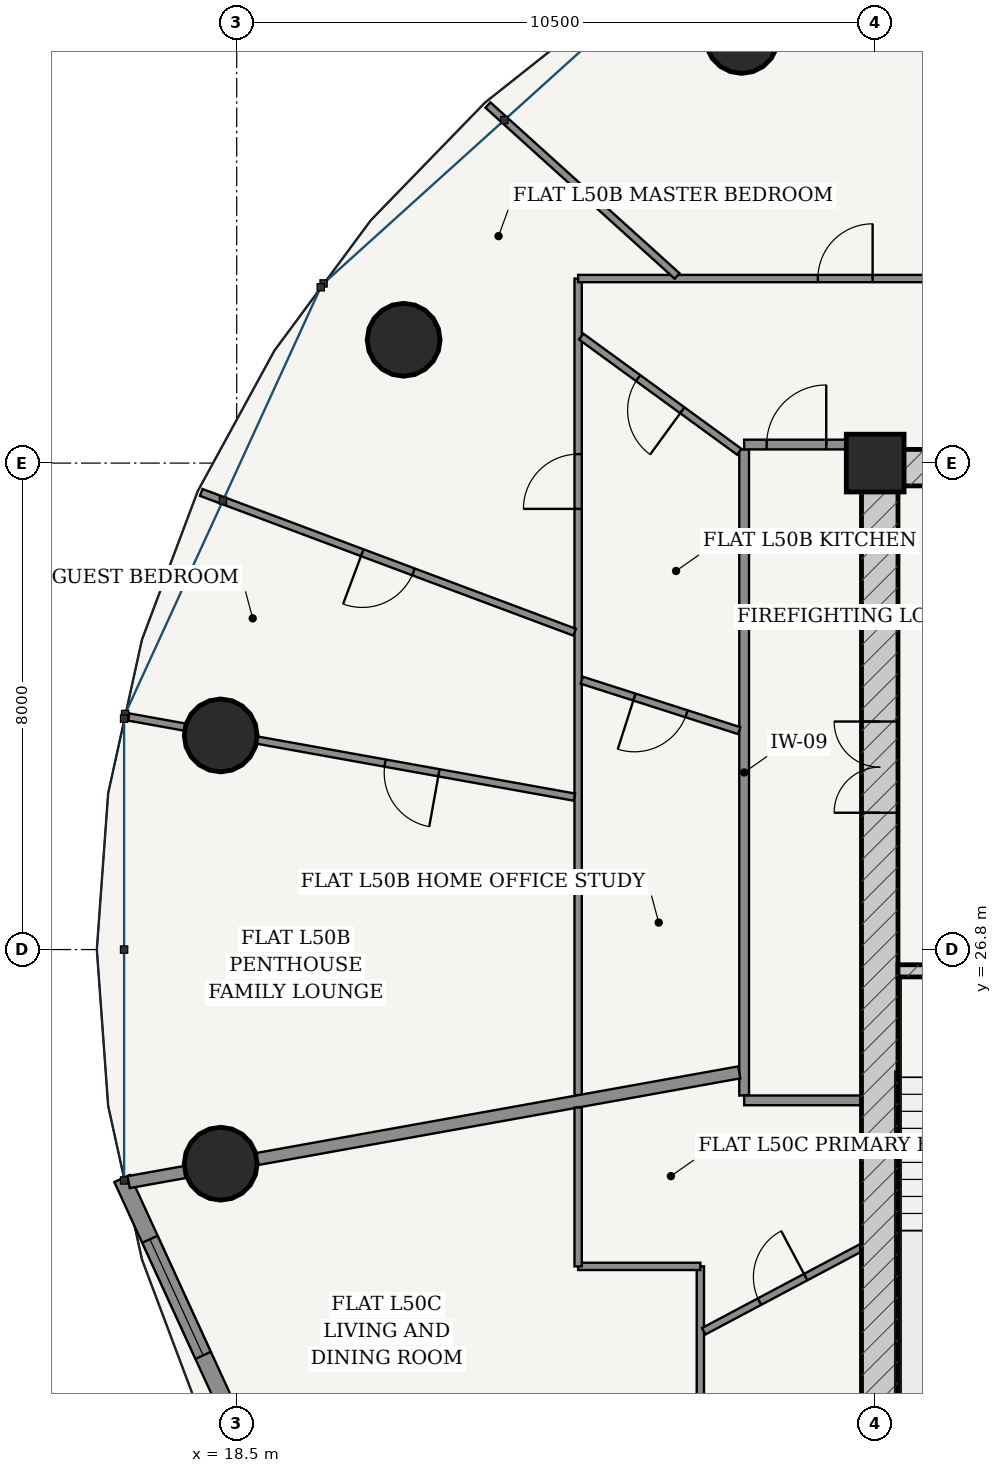
"""IFC4 building model, lengths in metres.
Left out: names, types, materials, properties, quantities, classifications, styles, units other than length and angle.
Written with IfcOpenShell. Run it as: python <this file> out.ifc"""

import sys

from ifc_helpers import new_model, si_unit, direction, frame, frame_2d, origin, origin_2d, place, context, subcontext, project, spatial, rectangle, hollow_circle, extrude, source, transform, mapped, element, fill, save


model = new_model("IFC4")
c1 = context("Model", 3, precision=1e-05, world=origin(), true_north=direction((-0.2419218956, 0.970295726276)))
c2 = subcontext(c1, "Body", "Model", "MODEL_VIEW")
j1 = project(units=[si_unit("LENGTHUNIT", "METRE"), si_unit("PLANEANGLEUNIT", "RADIAN")], contexts=[c1])
p1 = place(None, origin())
s1 = spatial("IfcSite", under=j1, at=p1, CompositionType="ELEMENT")
p2 = place(p1, origin())
s2 = spatial("IfcBuilding", under=s1, at=p2, CompositionType="ELEMENT")
p3 = place(p2, frame((0.0, 0.0, 191.2)))
s3 = spatial("IfcBuildingStorey", under=s2, at=p3, CompositionType="ELEMENT", Elevation=191.2)
p4 = place(p3, frame((29.0, 34.8, 0.0), z_axis=(0.0, 0.0, 1.0), x_axis=(1.0, 0.0, 0.0)))
e1 = element("IfcColumn", 1, at=p4, inside=s3, PredefinedType="COLUMN", context=c2, shape_type="SweptSolid", body=[
    extrude(rectangle(XDim=0.95, YDim=0.95, at=origin_2d()), origin(), (0.0, 0.0, 1.0), 3.7),
])
p5 = place(p3, frame((28.775, 34.725, 0.0), z_axis=(0.0, 0.0, 1.0), x_axis=(1.0, 0.0, 0.0)))
e2 = element("IfcWall", 2, at=p5, inside=s3, PredefinedType="SHEAR", context=c2, shape_type="SweptSolid", body=[
    extrude(rectangle(XDim=18.45, YDim=0.6, at=frame_2d((9.225, 0.0))), origin(), (0.0, 0.0, 1.0), 3.435),
])
p6 = place(p3, frame((29.075, 19.175, 0.0), z_axis=(0.0, 0.0, 1.0), x_axis=(0.0, 1.0, 0.0)))
e3 = element("IfcWall", 3, at=p6, inside=s3, PredefinedType="SHEAR", context=c2, shape_type="SweptSolid", body=[
    extrude(rectangle(XDim=15.25, YDim=0.6, at=frame_2d((7.625, 0.0))), origin(), (0.0, 0.0, 1.0), 3.435),
])
p7 = place(p6, frame((9.875, 0.0, 0.0)))
e4 = element("IfcOpeningElement", 4, at=p7, cuts=e3, PredefinedType="OPENING", context=c2, shape_type="SweptSolid", body=[
    extrude(rectangle(XDim=1.5, YDim=2.2, at=frame_2d((0.75, 1.1))), frame((0.0, 0.31, 0.0), z_axis=(0.0, -1.0, 0.0), x_axis=(1.0, 0.0, 0.0)), (0.0, 0.0, 1.0), 0.62),
])
p8 = place(p3, frame((29.375, 26.45, 0.0), z_axis=(0.0, 0.0, 1.0), x_axis=(1.0, 0.0, 0.0)))
e5 = element("IfcWall", 5, at=p8, inside=s3, PredefinedType="SOLIDWALL", context=c2, shape_type="SweptSolid", body=[
    extrude(rectangle(XDim=3.32, YDim=0.2, at=frame_2d((1.66, 0.0))), origin(), (0.0, 0.0, 1.0), 3.435),
])
p9 = place(p8, frame((1.185, 0.0, 0.0)))
e6 = element("IfcOpeningElement", 6, at=p9, cuts=e5, PredefinedType="OPENING", context=c2, shape_type="SweptSolid", body=[
    extrude(rectangle(XDim=0.95, YDim=2.15, at=frame_2d((0.475, 1.075))), frame((0.0, 0.11, 0.0), z_axis=(0.0, -1.0, 0.0), x_axis=(1.0, 0.0, 0.0)), (0.0, 0.0, 1.0), 0.22),
])
for number, where, z_axis, x_axis in (
    (7, (26.805, 41.808, 0.0), (0.0, 0.0, 1.0), (1.0, 0.0, 0.0)),
    (8, (21.246, 36.828, 0.0), (0.0, 0.0, 1.0), (1.0, 0.0, 0.0)),
    (9, (18.237, 30.321, 0.0), (0.0, 0.0, 1.0), (1.0, 0.0, 0.0)),
    (10, (18.237, 23.279, 0.0), (0.0, 0.0, 1.0), (1.0, 0.0, 0.0)),
):
    element("IfcColumn", number, at=place(p3, frame(where, z_axis=z_axis, x_axis=x_axis)), inside=s3, PredefinedType="COLUMN", context=c2, shape_type="SweptSolid", body=[
        extrude(hollow_circle(Radius=0.6, WallThickness=0.038, at=origin_2d()), origin(), (0.0, 0.0, 1.0), 3.7),
    ])
p10 = place(p3, frame((16.615, 23.035, 0.0), z_axis=(0.0, 0.0, 1.0), x_axis=(0.416717018135, -0.909036262641, 0.0)))
e11 = element("IfcWall", 11, at=p10, inside=s3, PredefinedType="SOLIDWALL", context=c2, shape_type="SweptSolid", body=[
    extrude(rectangle(XDim=7.96, YDim=0.28, at=frame_2d((3.98, 0.0))), origin(), (0.0, 0.0, 1.0), 3.435),
])
p11 = place(p10, frame((1.099, 0.0, 0.85)))
e12 = element("IfcOpeningElement", 12, at=p11, cuts=e11, PredefinedType="OPENING", context=c2, shape_type="SweptSolid", body=[
    extrude(rectangle(XDim=2.1, YDim=1.95, at=frame_2d((1.05, 0.975))), frame((0.0, 0.15, 0.0), z_axis=(0.0, -1.0, 0.0), x_axis=(1.0, 0.0, 0.0)), (0.0, 0.0, 1.0), 0.3),
])
p12 = place(p10, frame((4.761, 0.0, 0.85)))
e13 = element("IfcOpeningElement", 13, at=p12, cuts=e11, PredefinedType="OPENING", context=c2, shape_type="SweptSolid", body=[
    extrude(rectangle(XDim=2.1, YDim=1.95, at=frame_2d((1.05, 0.975))), frame((0.0, 0.15, 0.0), z_axis=(0.0, -1.0, 0.0), x_axis=(1.0, 0.0, 0.0)), (0.0, 0.0, 1.0), 0.3),
])
p13 = place(p3, frame((26.845, 24.4, 0.0), z_axis=(0.0, 0.0, 1.0), x_axis=(0.0, 1.0, 0.0)))
e14 = element("IfcWall", 14, at=p13, inside=s3, PredefinedType="PARTITIONING", context=c2, shape_type="SweptSolid", body=[
    extrude(rectangle(XDim=10.625, YDim=0.16, at=frame_2d((5.312, 0.0))), origin(), (0.0, 0.0, 1.0), 2.951),
])
p14 = place(p3, frame((26.845, 35.105, 0.0), z_axis=(0.0, 0.0, 1.0), x_axis=(1.0, 0.0, 0.0)))
e15 = element("IfcWall", 15, at=p14, inside=s3, PredefinedType="PARTITIONING", context=c2, shape_type="SweptSolid", body=[
    extrude(rectangle(XDim=1.93, YDim=0.16, at=frame_2d((0.965, 0.0))), origin(), (0.0, 0.0, 1.0), 3.435),
])
p15 = place(p14, frame((0.37, 0.0, 0.0)))
e16 = element("IfcOpeningElement", 16, at=p15, cuts=e15, PredefinedType="OPENING", context=c2, shape_type="SweptSolid", body=[
    extrude(rectangle(XDim=0.98, YDim=2.2, at=frame_2d((0.49, 1.1))), frame((0.0, 0.09, 0.0), z_axis=(0.0, -1.0, 0.0), x_axis=(1.0, 0.0, 0.0)), (0.0, 0.0, 1.0), 0.18),
])
p16 = place(p3, frame((26.845, 24.32, 0.0), z_axis=(0.0, 0.0, 1.0), x_axis=(1.0, 0.0, 0.0)))
e17 = element("IfcWall", 17, at=p16, inside=s3, PredefinedType="PARTITIONING", context=c2, shape_type="SweptSolid", body=[
    extrude(rectangle(XDim=1.93, YDim=0.16, at=frame_2d((0.965, 0.0))), origin(), (0.0, 0.0, 1.0), 3.435),
])
p17 = place(p3, frame((24.115, 24.406, 0.0), z_axis=(0.0, 0.0, 1.0), x_axis=(0.0, 1.0, 0.0)))
e18 = element("IfcWall", 18, at=p17, inside=s3, PredefinedType="PARTITIONING", context=c2, shape_type="SweptSolid", body=[
    extrude(rectangle(XDim=13.429, YDim=0.12, at=frame_2d((6.714, 0.0))), origin(), (0.0, 0.0, 1.0), 2.951),
])
p18 = place(p17, frame((9.641, 0.0, 0.0)))
e19 = element("IfcOpeningElement", 19, at=p18, cuts=e18, PredefinedType="OPENING", context=c2, shape_type="SweptSolid", body=[
    extrude(rectangle(XDim=0.9, YDim=2.15, at=frame_2d((0.45, 1.075))), frame((0.0, 0.07, 0.0), z_axis=(0.0, -1.0, 0.0), x_axis=(1.0, 0.0, 0.0)), (0.0, 0.0, 1.0), 0.14),
])
p19 = place(p3, frame((24.115, 37.835, 0.0), z_axis=(0.0, 0.0, 1.0), x_axis=(1.0, 0.0, 0.0)))
e20 = element("IfcWall", 20, at=p19, inside=s3, PredefinedType="PARTITIONING", context=c2, shape_type="SweptSolid", body=[
    extrude(rectangle(XDim=7.47, YDim=0.12, at=frame_2d((3.735, 0.0))), origin(), (0.0, 0.0, 1.0), 2.951),
])
p20 = place(p19, frame((3.943, 0.0, 0.0)))
e21 = element("IfcOpeningElement", 21, at=p20, cuts=e20, PredefinedType="OPENING", context=c2, shape_type="SweptSolid", body=[
    extrude(rectangle(XDim=0.9, YDim=2.15, at=frame_2d((0.45, 1.075))), frame((0.0, 0.07, 0.0), z_axis=(0.0, -1.0, 0.0), x_axis=(1.0, 0.0, 0.0)), (0.0, 0.0, 1.0), 0.14),
])
p21 = place(p3, frame((25.743, 37.876, 0.0), z_axis=(0.0, 0.0, 1.0), x_axis=(-0.741943837234, 0.670462036502, 0.0)))
e22 = element("IfcWall", 22, at=p21, inside=s3, PredefinedType="PARTITIONING", context=c2, shape_type="SweptSolid", body=[
    extrude(rectangle(XDim=4.194, YDim=0.12, at=frame_2d((2.097, 0.0))), origin(), (0.0, 0.0, 1.0), 2.951),
])
p22 = place(p3, frame((24.057, 32.019, 0.0), z_axis=(0.0, 0.0, 1.0), x_axis=(-0.936540194592, 0.350560214389, 0.0)))
e23 = element("IfcWall", 23, at=p22, inside=s3, PredefinedType="PARTITIONING", context=c2, shape_type="SweptSolid", body=[
    extrude(rectangle(XDim=6.556, YDim=0.12, at=frame_2d((3.278, 0.0))), origin(), (0.0, 0.0, 1.0), 2.951),
])
p23 = place(p22, frame((2.828, 0.0, 0.0)))
e24 = element("IfcOpeningElement", 24, at=p23, cuts=e23, PredefinedType="OPENING", context=c2, shape_type="SweptSolid", body=[
    extrude(rectangle(XDim=0.9, YDim=2.15, at=frame_2d((0.45, 1.075))), frame((0.0, 0.07, 0.0), z_axis=(0.0, -1.0, 0.0), x_axis=(1.0, 0.0, 0.0)), (0.0, 0.0, 1.0), 0.14),
])
p24 = place(p3, frame((24.054, 29.307, 0.0), z_axis=(0.0, 0.0, 1.0), x_axis=(-0.984227185588, 0.176909149424, 0.0)))
e25 = element("IfcWall", 25, at=p24, inside=s3, PredefinedType="PARTITIONING", context=c2, shape_type="SweptSolid", body=[
    extrude(rectangle(XDim=7.448, YDim=0.12, at=frame_2d((3.724, 0.0))), origin(), (0.0, 0.0, 1.0), 2.951),
])
p25 = place(p24, frame((2.264, 0.0, 0.0)))
e26 = element("IfcOpeningElement", 26, at=p25, cuts=e25, PredefinedType="OPENING", context=c2, shape_type="SweptSolid", body=[
    extrude(rectangle(XDim=0.9, YDim=2.15, at=frame_2d((0.45, 1.075))), frame((0.0, 0.07, 0.0), z_axis=(0.0, -1.0, 0.0), x_axis=(1.0, 0.0, 0.0)), (0.0, 0.0, 1.0), 0.14),
])
p26 = place(p3, frame((26.765, 34.986, 0.0), z_axis=(0.0, 0.0, 1.0), x_axis=(-0.808220499107, 0.588879974887, 0.0)))
e27 = element("IfcWall", 27, at=p26, inside=s3, PredefinedType="PARTITIONING", context=c2, shape_type="SweptSolid", body=[
    extrude(rectangle(XDim=3.217, YDim=0.12, at=frame_2d((1.608, 0.0))), origin(), (0.0, 0.0, 1.0), 3.11),
])
p27 = place(p26, frame((1.158, 0.0, 0.0)))
e28 = element("IfcOpeningElement", 28, at=p27, cuts=e27, PredefinedType="OPENING", context=c2, shape_type="SweptSolid", body=[
    extrude(rectangle(XDim=0.9, YDim=2.15, at=frame_2d((0.45, 1.075))), frame((0.0, 0.07, 0.0), z_axis=(0.0, -1.0, 0.0), x_axis=(1.0, 0.0, 0.0)), (0.0, 0.0, 1.0), 0.14),
])
p28 = place(p3, frame((26.765, 30.4, 0.0), z_axis=(0.0, 0.0, 1.0), x_axis=(-0.952315722301, 0.305114347514, 0.0)))
e29 = element("IfcWall", 29, at=p28, inside=s3, PredefinedType="PARTITIONING", context=c2, shape_type="SweptSolid", body=[
    extrude(rectangle(XDim=2.72, YDim=0.12, at=frame_2d((1.36, 0.0))), origin(), (0.0, 0.0, 1.0), 3.435),
])
p29 = place(p28, frame((0.91, 0.0, 0.0)))
e30 = element("IfcOpeningElement", 30, at=p29, cuts=e29, PredefinedType="OPENING", context=c2, shape_type="SweptSolid", body=[
    extrude(rectangle(XDim=0.9, YDim=2.15, at=frame_2d((0.45, 1.075))), frame((0.0, 0.07, 0.0), z_axis=(0.0, -1.0, 0.0), x_axis=(1.0, 0.0, 0.0)), (0.0, 0.0, 1.0), 0.14),
])
p30 = place(p3, frame((26.765, 24.781, 0.0), z_axis=(0.0, 0.0, 1.0), x_axis=(-0.984226684914, -0.176911934879, 0.0)))
e31 = element("IfcWall", 31, at=p30, inside=s3, PredefinedType="PARTITIONING", context=c2, shape_type="SweptSolid", body=[
    extrude(rectangle(XDim=10.202, YDim=0.2, at=frame_2d((5.101, 0.0))), origin(), (0.0, 0.0, 1.0), 2.951),
])
p31 = place(p3, frame((26.125, 15.925, 0.0), z_axis=(0.0, 0.0, 1.0), x_axis=(0.0, 1.0, 0.0)))
e32 = element("IfcWall", 32, at=p31, inside=s3, PredefinedType="PARTITIONING", context=c2, shape_type="SweptSolid", body=[
    extrude(rectangle(XDim=5.665, YDim=0.12, at=frame_2d((2.833, 0.0))), origin(), (0.0, 0.0, 1.0), 2.951),
])
p32 = place(p31, frame((2.01, 0.0, 0.0)))
e33 = element("IfcOpeningElement", 33, at=p32, cuts=e32, PredefinedType="OPENING", context=c2, shape_type="SweptSolid", body=[
    extrude(rectangle(XDim=0.9, YDim=2.15, at=frame_2d((0.45, 1.075))), frame((0.0, 0.07, 0.0), z_axis=(0.0, -1.0, 0.0), x_axis=(1.0, 0.0, 0.0)), (0.0, 0.0, 1.0), 0.14),
])
p33 = place(p3, frame((26.125, 21.59, 0.0), z_axis=(0.0, 0.0, 1.0), x_axis=(-1.0, 0.0, 0.0)))
e34 = element("IfcWall", 34, at=p33, inside=s3, PredefinedType="PARTITIONING", context=c2, shape_type="SweptSolid", body=[
    extrude(rectangle(XDim=2.01, YDim=0.12, at=frame_2d((1.005, 0.0))), origin(), (0.0, 0.0, 1.0), 3.11),
])
p34 = place(p3, frame((24.115, 21.59, 0.0), z_axis=(0.0, 0.0, 1.0), x_axis=(0.0, 1.0, 0.0)))
e35 = element("IfcWall", 35, at=p34, inside=s3, PredefinedType="PARTITIONING", context=c2, shape_type="SweptSolid", body=[
    extrude(rectangle(XDim=2.612, YDim=0.12, at=frame_2d((1.306, 0.0))), origin(), (0.0, 0.0, 1.0), 3.11),
])
p35 = place(p3, frame((28.775, 21.901, 0.0), z_axis=(0.0, 0.0, 1.0), x_axis=(-0.883156592468, -0.46907828044, 0.0)))
e36 = element("IfcWall", 36, at=p35, inside=s3, PredefinedType="PARTITIONING", context=c2, shape_type="SweptSolid", body=[
    extrude(rectangle(XDim=2.938, YDim=0.12, at=frame_2d((1.469, 0.0))), origin(), (0.0, 0.0, 1.0), 3.435),
])
p36 = place(p35, frame((1.039, 0.0, 0.0)))
e37 = element("IfcOpeningElement", 37, at=p36, cuts=e36, PredefinedType="OPENING", context=c2, shape_type="SweptSolid", body=[
    extrude(rectangle(XDim=0.86, YDim=2.15, at=frame_2d((0.43, 1.075))), frame((0.0, 0.07, 0.0), z_axis=(0.0, -1.0, 0.0), x_axis=(1.0, 0.0, 0.0)), (0.0, 0.0, 1.0), 0.14),
])
m1 = source(origin(), c2, "Body", "SweptSolid", [
    extrude(rectangle(XDim=2.1, YDim=1.95, at=frame_2d((1.05, 0.975))), frame((0.0, 0.03, 0.0), z_axis=(0.0, -1.0, 0.0), x_axis=(1.0, 0.0, 0.0)), (0.0, 0.0, 1.0), 0.06),
])
p37 = place(p11, origin())
e38 = element("IfcWindow", 38, at=p37, inside=s3, PartitioningType="SINGLE_PANEL", PredefinedType="WINDOW", context=c2, shape_type="MappedRepresentation", body=[
    mapped(m1, transform((0.0, 0.0, 0.0), scale=1.0)),
])
fill(e12, e38)
m2 = source(origin(), c2, "Body", "SweptSolid", [
    extrude(rectangle(XDim=1.5, YDim=2.2, at=frame_2d((0.75, 1.1))), frame((0.0, 0.025, 0.0), z_axis=(0.0, -1.0, 0.0), x_axis=(1.0, 0.0, 0.0)), (0.0, 0.0, 1.0), 0.05),
])
p38 = place(p7, origin())
e39 = element("IfcDoor", 39, at=p38, inside=s3, OperationType="DOUBLE_DOOR_SINGLE_SWING", PredefinedType="DOOR", context=c2, shape_type="MappedRepresentation", body=[
    mapped(m2, transform((0.0, 0.0, 0.0), scale=1.0)),
])
fill(e4, e39)
m3 = source(origin(), c2, "Body", "SweptSolid", [
    extrude(rectangle(XDim=0.98, YDim=2.2, at=frame_2d((0.49, 1.1))), frame((0.0, 0.025, 0.0), z_axis=(0.0, -1.0, 0.0), x_axis=(1.0, 0.0, 0.0)), (0.0, 0.0, 1.0), 0.05),
])
p39 = place(p15, origin())
e40 = element("IfcDoor", 40, at=p39, inside=s3, OperationType="SINGLE_SWING_RIGHT", PredefinedType="DOOR", context=c2, shape_type="MappedRepresentation", body=[
    mapped(m3, transform((0.0, 0.0, 0.0), scale=1.0)),
])
fill(e16, e40)
m4 = source(origin(), c2, "Body", "SweptSolid", [
    extrude(rectangle(XDim=0.9, YDim=2.15, at=frame_2d((0.45, 1.075))), frame((0.0, 0.025, 0.0), z_axis=(0.0, -1.0, 0.0), x_axis=(1.0, 0.0, 0.0)), (0.0, 0.0, 1.0), 0.05),
])
p40 = place(p20, origin())
e41 = element("IfcDoor", 41, at=p40, inside=s3, OperationType="SINGLE_SWING_RIGHT", PredefinedType="DOOR", context=c2, shape_type="MappedRepresentation", body=[
    mapped(m4, transform((0.0, 0.0, 0.0), scale=1.0)),
])
fill(e21, e41)
p41 = place(p27, origin())
e42 = element("IfcDoor", 42, at=p41, inside=s3, OperationType="SINGLE_SWING_LEFT", PredefinedType="DOOR", context=c2, shape_type="MappedRepresentation", body=[
    mapped(m4, transform((0.0, 0.0, 0.0), scale=1.0)),
])
fill(e28, e42)
p42 = place(p29, origin())
e43 = element("IfcDoor", 43, at=p42, inside=s3, OperationType="SINGLE_SWING_RIGHT", PredefinedType="DOOR", context=c2, shape_type="MappedRepresentation", body=[
    mapped(m4, transform((0.0, 0.0, 0.0), scale=1.0)),
])
fill(e30, e43)
p43 = place(p18, origin())
e44 = element("IfcDoor", 44, at=p43, inside=s3, OperationType="SINGLE_SWING_LEFT", PredefinedType="DOOR", context=c2, shape_type="MappedRepresentation", body=[
    mapped(m4, transform((0.0, 0.0, 0.0), scale=1.0)),
])
fill(e19, e44)
p44 = place(p23, origin())
e45 = element("IfcDoor", 45, at=p44, inside=s3, OperationType="SINGLE_SWING_RIGHT", PredefinedType="DOOR", context=c2, shape_type="MappedRepresentation", body=[
    mapped(m4, transform((0.0, 0.0, 0.0), scale=1.0)),
])
fill(e24, e45)
p45 = place(p25, origin())
e46 = element("IfcDoor", 46, at=p45, inside=s3, OperationType="SINGLE_SWING_LEFT", PredefinedType="DOOR", context=c2, shape_type="MappedRepresentation", body=[
    mapped(m4, transform((0.0, 0.0, 0.0), scale=1.0)),
])
fill(e26, e46)
m5 = source(origin(), c2, "Body", "SweptSolid", [
    extrude(rectangle(XDim=0.86, YDim=2.15, at=frame_2d((0.43, 1.075))), frame((0.0, 0.025, 0.0), z_axis=(0.0, -1.0, 0.0), x_axis=(1.0, 0.0, 0.0)), (0.0, 0.0, 1.0), 0.05),
])
p46 = place(p36, frame((0.86, 0.0, 0.0), z_axis=(0.0, 0.0, 1.0), x_axis=(-1.0, 0.0, 0.0)))
e47 = element("IfcDoor", 47, at=p46, inside=s3, OperationType="SINGLE_SWING_RIGHT", PredefinedType="DOOR", context=c2, shape_type="MappedRepresentation", body=[
    mapped(m5, transform((0.0, 0.0, 0.0), scale=1.0)),
])
fill(e37, e47)
save(model, sys.argv[1])
